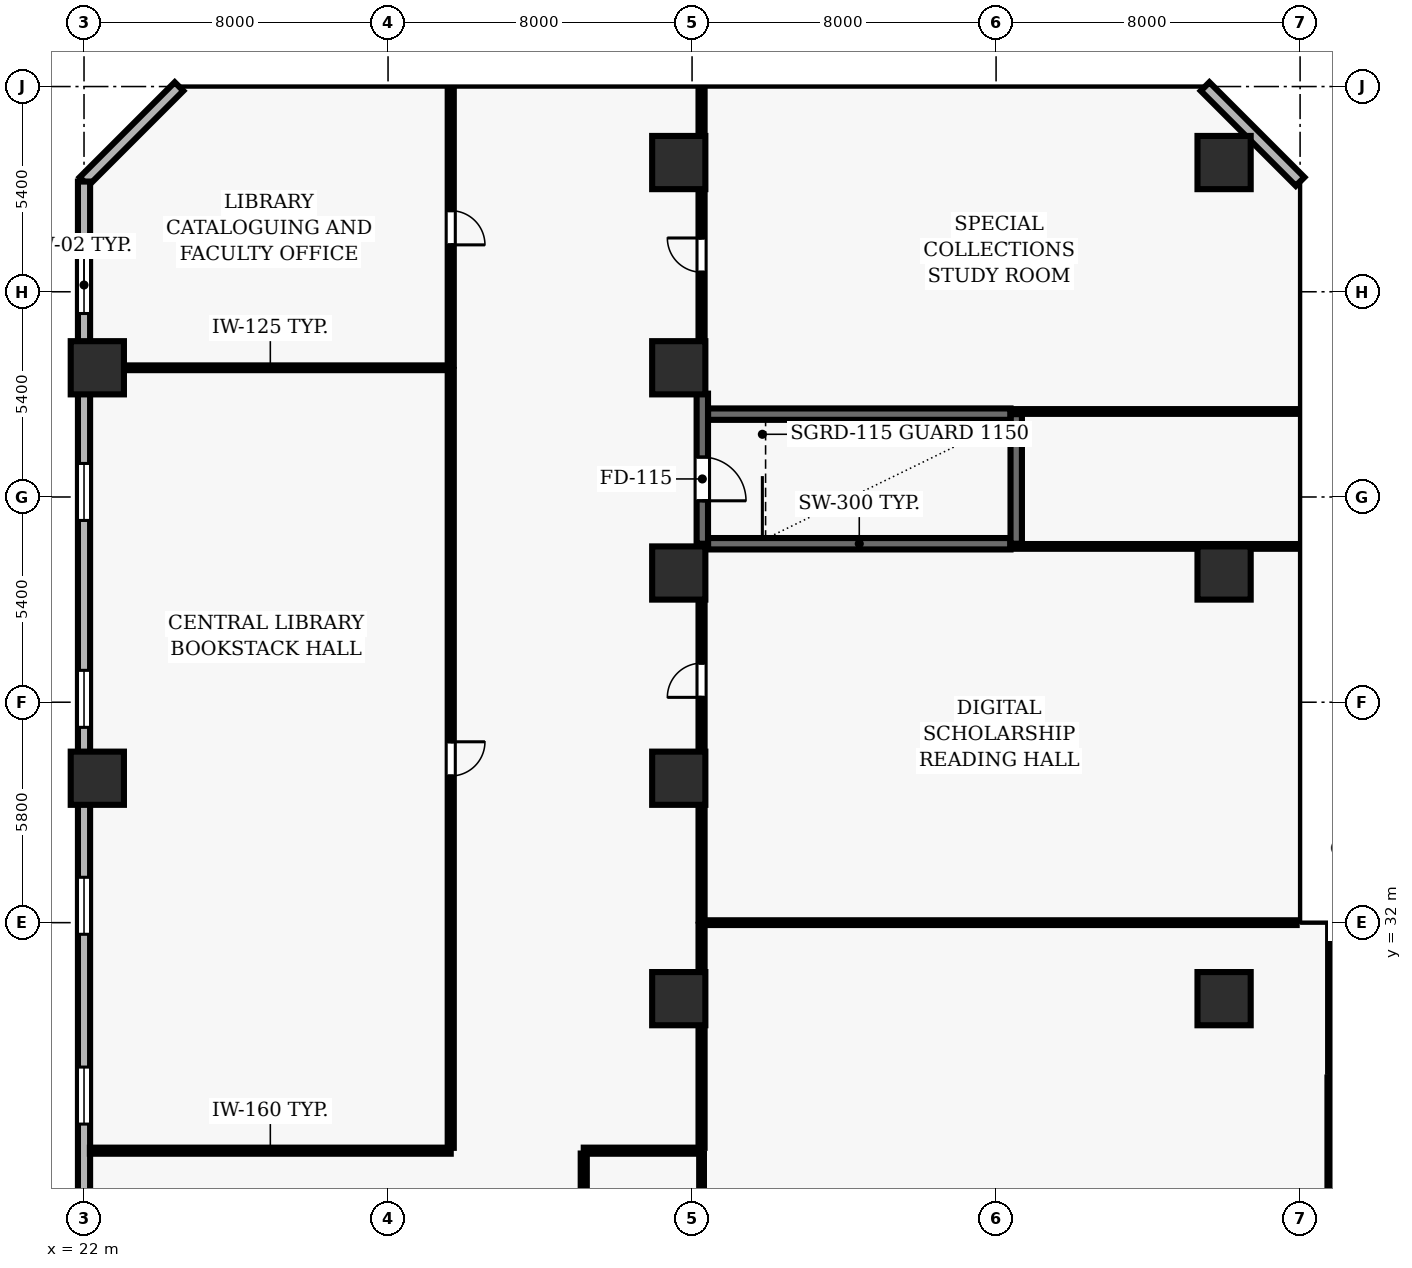
"""IFC4 building model, lengths in metres.
Left out: names, types, materials, properties, quantities, classifications, styles, units other than length and angle.
Written with IfcOpenShell. Run it as: python <this file> out.ifc"""

import sys

from ifc_helpers import new_model, si_unit, direction, frame, frame_2d, origin, origin_2d, place, context, subcontext, project, spatial, rectangle, extrude, element, fill, save


model = new_model("IFC4")
c1 = context("Model", 3, precision=1e-05, world=origin(), true_north=direction((0.0, 1.0)))
c2 = subcontext(c1, "Body", "Model", "MODEL_VIEW")
j1 = project(units=[si_unit("LENGTHUNIT", "METRE"), si_unit("PLANEANGLEUNIT", "RADIAN")], contexts=[c1])
p1 = place(None, origin())
s1 = spatial("IfcSite", under=j1, at=p1, CompositionType="ELEMENT")
p2 = place(p1, origin())
s2 = spatial("IfcBuilding", under=s1, at=p2, CompositionType="ELEMENT")
p3 = place(p2, frame((0.0, 0.0, 20.8)))
s3 = spatial("IfcBuildingStorey", under=s2, at=p3, CompositionType="ELEMENT", Elevation=20.8)
for number, where, z_axis, x_axis in (
    (1, (37.65, 30.0, 0.0), (0.0, 0.0, 1.0), (1.0, 0.0, 0.0)),
    (2, (22.35, 35.8, 0.0), (0.0, 0.0, 1.0), (1.0, 0.0, 0.0)),
    (3, (37.65, 35.8, 0.0), (0.0, 0.0, 1.0), (1.0, 0.0, 0.0)),
    (4, (37.65, 41.2, 0.0), (0.0, 0.0, 1.0), (1.0, 0.0, 0.0)),
    (5, (22.35, 46.6, 0.0), (0.0, 0.0, 1.0), (1.0, 0.0, 0.0)),
    (6, (37.65, 46.6, 0.0), (0.0, 0.0, 1.0), (1.0, 0.0, 0.0)),
    (7, (37.65, 52.0, 0.0), (0.0, 0.0, 1.0), (1.0, 0.0, 0.0)),
    (8, (52.0, 30.0, 0.0), (0.0, 0.0, 1.0), (1.0, 0.0, 0.0)),
    (9, (52.0, 41.2, 0.0), (0.0, 0.0, 1.0), (1.0, 0.0, 0.0)),
    (10, (52.0, 52.0, 0.0), (0.0, 0.0, 1.0), (1.0, 0.0, 0.0)),
):
    element("IfcColumn", number, at=place(p3, frame(where, z_axis=z_axis, x_axis=x_axis)), inside=s3, PredefinedType="COLUMN", context=c2, shape_type="SweptSolid", body=[
        extrude(rectangle(XDim=1.4, YDim=1.4, at=origin_2d()), origin(), (0.0, 0.0, 1.0), 5.2),
    ])
for number, where, z_axis, x_axis in (
    (11, (54.0, 51.5, 0.0), (0.0, 0.0, 1.0), (-0.707, 0.707, 0.0)),
    (12, (24.5, 54.0, 0.0), (0.0, 0.0, 1.0), (-0.707, -0.707, 0.0)),
):
    element("IfcWall", number, at=place(p3, frame(where, z_axis=z_axis, x_axis=x_axis)), inside=s3, PredefinedType="SOLIDWALL", context=c2, shape_type="SweptSolid", body=[
        extrude(rectangle(XDim=3.536, YDim=0.32, at=frame_2d((1.768, 0.0))), origin(), (0.0, 0.0, 1.0), 4.78),
    ])
p4 = place(p3, frame((22.0, 51.5, 0.0), z_axis=(0.0, 0.0, 1.0), x_axis=(0.0, -1.0, 0.0)))
e13 = element("IfcWall", 13, at=p4, inside=s3, PredefinedType="SOLIDWALL", context=c2, shape_type="SweptSolid", body=[
    extrude(rectangle(XDim=49.0, YDim=0.32, at=frame_2d((24.5, 0.0))), origin(), (0.0, 0.0, 1.0), 4.78),
])
p5 = place(p4, frame((1.972, 0.0, 0.9)))
e14 = element("IfcOpeningElement", 14, at=p5, cuts=e13, PredefinedType="OPENING", context=c2, shape_type="SweptSolid", body=[
    extrude(rectangle(XDim=1.5, YDim=1.6, at=frame_2d((0.75, 0.8))), frame((0.0, 0.17, 0.0), z_axis=(0.0, -1.0, 0.0), x_axis=(1.0, 0.0, 0.0)), (0.0, 0.0, 1.0), 0.34),
])
p6 = place(p4, frame((7.417, 0.0, 0.9)))
e15 = element("IfcOpeningElement", 15, at=p6, cuts=e13, PredefinedType="OPENING", context=c2, shape_type="SweptSolid", body=[
    extrude(rectangle(XDim=1.5, YDim=1.6, at=frame_2d((0.75, 0.8))), frame((0.0, 0.17, 0.0), z_axis=(0.0, -1.0, 0.0), x_axis=(1.0, 0.0, 0.0)), (0.0, 0.0, 1.0), 0.34),
])
p7 = place(p4, frame((12.861, 0.0, 0.9)))
e16 = element("IfcOpeningElement", 16, at=p7, cuts=e13, PredefinedType="OPENING", context=c2, shape_type="SweptSolid", body=[
    extrude(rectangle(XDim=1.5, YDim=1.6, at=frame_2d((0.75, 0.8))), frame((0.0, 0.17, 0.0), z_axis=(0.0, -1.0, 0.0), x_axis=(1.0, 0.0, 0.0)), (0.0, 0.0, 1.0), 0.34),
])
p8 = place(p4, frame((18.306, 0.0, 0.9)))
e17 = element("IfcOpeningElement", 17, at=p8, cuts=e13, PredefinedType="OPENING", context=c2, shape_type="SweptSolid", body=[
    extrude(rectangle(XDim=1.5, YDim=1.6, at=frame_2d((0.75, 0.8))), frame((0.0, 0.17, 0.0), z_axis=(0.0, -1.0, 0.0), x_axis=(1.0, 0.0, 0.0)), (0.0, 0.0, 1.0), 0.34),
])
p9 = place(p4, frame((23.3, 0.0, 0.9)))
e18 = element("IfcOpeningElement", 18, at=p9, cuts=e13, PredefinedType="OPENING", context=c2, shape_type="SweptSolid", body=[
    extrude(rectangle(XDim=1.5, YDim=1.6, at=frame_2d((0.75, 0.8))), frame((0.0, 0.17, 0.0), z_axis=(0.0, -1.0, 0.0), x_axis=(1.0, 0.0, 0.0)), (0.0, 0.0, 1.0), 0.34),
])
p10 = place(p4, frame((29.194, 0.0, 0.9)))
e19 = element("IfcOpeningElement", 19, at=p10, cuts=e13, PredefinedType="OPENING", context=c2, shape_type="SweptSolid", body=[
    extrude(rectangle(XDim=1.5, YDim=1.6, at=frame_2d((0.75, 0.8))), frame((0.0, 0.17, 0.0), z_axis=(0.0, -1.0, 0.0), x_axis=(1.0, 0.0, 0.0)), (0.0, 0.0, 1.0), 0.34),
])
p11 = place(p4, frame((34.189, 0.0, 0.9)))
e20 = element("IfcOpeningElement", 20, at=p11, cuts=e13, PredefinedType="OPENING", context=c2, shape_type="SweptSolid", body=[
    extrude(rectangle(XDim=1.5, YDim=1.6, at=frame_2d((0.75, 0.8))), frame((0.0, 0.17, 0.0), z_axis=(0.0, -1.0, 0.0), x_axis=(1.0, 0.0, 0.0)), (0.0, 0.0, 1.0), 0.34),
])
p12 = place(p4, frame((40.083, 0.0, 0.9)))
e21 = element("IfcOpeningElement", 21, at=p12, cuts=e13, PredefinedType="OPENING", context=c2, shape_type="SweptSolid", body=[
    extrude(rectangle(XDim=1.5, YDim=1.6, at=frame_2d((0.75, 0.8))), frame((0.0, 0.17, 0.0), z_axis=(0.0, -1.0, 0.0), x_axis=(1.0, 0.0, 0.0)), (0.0, 0.0, 1.0), 0.34),
])
p13 = place(p3, frame((38.42, 41.97, 0.0), z_axis=(0.0, 0.0, 1.0), x_axis=(1.0, 0.0, 0.0)))
e22 = element("IfcWall", 22, at=p13, inside=s3, PredefinedType="SHEAR", context=c2, shape_type="SweptSolid", body=[
    extrude(rectangle(XDim=7.96, YDim=0.3, at=frame_2d((3.98, 0.0))), origin(), (0.0, 0.0, 1.0), 4.78),
])
p14 = place(p3, frame((46.53, 41.97, 0.0), z_axis=(0.0, 0.0, 1.0), x_axis=(0.0, 1.0, 0.0)))
e23 = element("IfcWall", 23, at=p14, inside=s3, PredefinedType="SHEAR", context=c2, shape_type="SweptSolid", body=[
    extrude(rectangle(XDim=3.41, YDim=0.3, at=frame_2d((1.705, 0.0))), origin(), (0.0, 0.0, 1.0), 4.78),
])
p15 = place(p3, frame((46.38, 45.38, 0.0), z_axis=(0.0, 0.0, 1.0), x_axis=(-1.0, 0.0, 0.0)))
e24 = element("IfcWall", 24, at=p15, inside=s3, PredefinedType="SHEAR", context=c2, shape_type="SweptSolid", body=[
    extrude(rectangle(XDim=7.96, YDim=0.3, at=frame_2d((3.98, 0.0))), origin(), (0.0, 0.0, 1.0), 4.78),
])
p16 = place(p3, frame((38.27, 45.92, 0.0), z_axis=(0.0, 0.0, 1.0), x_axis=(0.0, -1.0, 0.0)))
e25 = element("IfcWall", 25, at=p16, inside=s3, PredefinedType="SHEAR", context=c2, shape_type="SweptSolid", body=[
    extrude(rectangle(XDim=3.95, YDim=0.3, at=frame_2d((1.975, 0.0))), origin(), (0.0, 0.0, 1.0), 4.78),
])
p17 = place(p16, frame((1.67, 0.0, 0.0)))
e26 = element("IfcOpeningElement", 26, at=p17, cuts=e25, PredefinedType="OPENING", context=c2, shape_type="SweptSolid", body=[
    extrude(rectangle(XDim=1.15, YDim=2.15, at=frame_2d((0.575, 1.075))), frame((0.0, 0.16, 0.0), z_axis=(0.0, -1.0, 0.0), x_axis=(1.0, 0.0, 0.0)), (0.0, 0.0, 1.0), 0.32),
])
p18 = place(p3, frame((31.65, 26.0, 0.0), z_axis=(0.0, 0.0, 1.0), x_axis=(-1.0, 0.0, 0.0)))
e27 = element("IfcWall", 27, at=p18, inside=s3, PredefinedType="PARTITIONING", context=c2, shape_type="SweptSolid", body=[
    extrude(rectangle(XDim=9.495, YDim=0.16, at=frame_2d((4.748, 0.0))), origin(), (0.0, 0.0, 1.0), 4.78),
])
p19 = place(p3, frame((31.65, 46.6, 0.0), z_axis=(0.0, 0.0, 1.0), x_axis=(-1.0, 0.0, 0.0)))
e28 = element("IfcWall", 28, at=p19, inside=s3, PredefinedType="PARTITIONING", context=c2, shape_type="SweptSolid", body=[
    extrude(rectangle(XDim=9.495, YDim=0.125, at=frame_2d((4.748, 0.0))), origin(), (0.0, 0.0, 1.0), 3.58),
])
p20 = place(p3, frame((35.15, 26.0, 0.0), z_axis=(0.0, 0.0, 1.0), x_axis=(1.0, 0.0, 0.0)))
e29 = element("IfcWall", 29, at=p20, inside=s3, PredefinedType="PARTITIONING", context=c2, shape_type="SweptSolid", body=[
    extrude(rectangle(XDim=3.1, YDim=0.16, at=frame_2d((1.55, 0.0))), origin(), (0.0, 0.0, 1.0), 4.78),
])
p21 = place(p3, frame((38.25, 32.0, 0.0), z_axis=(0.0, 0.0, 1.0), x_axis=(1.0, 0.0, 0.0)))
e30 = element("IfcWall", 30, at=p21, inside=s3, PredefinedType="PARTITIONING", context=c2, shape_type="SweptSolid", body=[
    extrude(rectangle(XDim=15.66, YDim=0.125, at=frame_2d((7.83, 0.0))), origin(), (0.0, 0.0, 1.0), 4.78),
])
for number, where, z_axis, x_axis in (
    (31, (46.38, 45.45, 0.0), (0.0, 0.0, 1.0), (1.0, 0.0, 0.0)),
    (32, (53.91, 41.9, 0.0), (0.0, 0.0, 1.0), (-1.0, 0.0, 0.0)),
):
    element("IfcWall", number, at=place(p3, frame(where, z_axis=z_axis, x_axis=x_axis)), inside=s3, PredefinedType="PARTITIONING", context=c2, shape_type="SweptSolid", body=[
        extrude(rectangle(XDim=7.53, YDim=0.125, at=frame_2d((3.765, 0.0))), origin(), (0.0, 0.0, 1.0), 4.78),
    ])
p22 = place(p3, frame((58.45, 28.0, 0.0), z_axis=(0.0, 0.0, 1.0), x_axis=(-1.0, 0.0, 0.0)))
e33 = element("IfcWall", 33, at=p22, inside=s3, PredefinedType="PARTITIONING", context=c2, shape_type="SweptSolid", body=[
    extrude(rectangle(XDim=3.65, YDim=0.16, at=frame_2d((1.825, 0.0))), origin(), (0.0, 0.0, 1.0), 4.78),
])
p23 = place(p3, frame((31.65, 46.543, 0.0), z_axis=(0.0, 0.0, 1.0), x_axis=(0.0, -1.0, 0.0)))
e34 = element("IfcWall", 34, at=p23, inside=s3, PredefinedType="PARTITIONING", context=c2, shape_type="SweptSolid", body=[
    extrude(rectangle(XDim=20.468, YDim=0.16, at=frame_2d((10.234, 0.0))), origin(), (0.0, 0.0, 1.0), 4.78),
])
p24 = place(p23, frame((9.784, 0.0, 0.0)))
e35 = element("IfcOpeningElement", 35, at=p24, cuts=e34, PredefinedType="OPENING", context=c2, shape_type="SweptSolid", body=[
    extrude(rectangle(XDim=0.9, YDim=2.1, at=frame_2d((0.45, 1.05))), frame((0.0, 0.09, 0.0), z_axis=(0.0, -1.0, 0.0), x_axis=(1.0, 0.0, 0.0)), (0.0, 0.0, 1.0), 0.18),
])
p25 = place(p3, frame((31.65, 53.91, 0.0), z_axis=(0.0, 0.0, 1.0), x_axis=(0.0, -1.0, 0.0)))
e36 = element("IfcWall", 36, at=p25, inside=s3, PredefinedType="PARTITIONING", context=c2, shape_type="SweptSolid", body=[
    extrude(rectangle(XDim=7.253, YDim=0.16, at=frame_2d((3.626, 0.0))), origin(), (0.0, 0.0, 1.0), 4.78),
])
p26 = place(p25, frame((3.176, 0.0, 0.0)))
e37 = element("IfcOpeningElement", 37, at=p26, cuts=e36, PredefinedType="OPENING", context=c2, shape_type="SweptSolid", body=[
    extrude(rectangle(XDim=0.9, YDim=2.1, at=frame_2d((0.45, 1.05))), frame((0.0, 0.09, 0.0), z_axis=(0.0, -1.0, 0.0), x_axis=(1.0, 0.0, 0.0)), (0.0, 0.0, 1.0), 0.18),
])
p27 = place(p3, frame((35.15, 24.07, 0.0), z_axis=(0.0, 0.0, 1.0), x_axis=(0.0, 1.0, 0.0)))
e38 = element("IfcWall", 38, at=p27, inside=s3, PredefinedType="PARTITIONING", context=c2, shape_type="SweptSolid", body=[
    extrude(rectangle(XDim=1.855, YDim=0.16, at=frame_2d((0.927, 0.0))), origin(), (0.0, 0.0, 1.0), 4.78),
])
p28 = place(p3, frame((38.25, 25.925, 0.0), z_axis=(0.0, 0.0, 1.0), x_axis=(0.0, -1.0, 0.0)))
e39 = element("IfcWall", 39, at=p28, inside=s3, PredefinedType="PARTITIONING", context=c2, shape_type="SweptSolid", body=[
    extrude(rectangle(XDim=15.2, YDim=0.125, at=frame_2d((7.6, 0.0))), origin(), (0.0, 0.0, 1.0), 4.78),
])
p29 = place(p3, frame((38.25, 26.075, 0.0), z_axis=(0.0, 0.0, 1.0), x_axis=(0.0, 1.0, 0.0)))
e40 = element("IfcWall", 40, at=p29, inside=s3, PredefinedType="PARTITIONING", context=c2, shape_type="SweptSolid", body=[
    extrude(rectangle(XDim=5.867, YDim=0.16, at=frame_2d((2.934, 0.0))), origin(), (0.0, 0.0, 1.0), 4.78),
])
p30 = place(p3, frame((38.25, 32.057, 0.0), z_axis=(0.0, 0.0, 1.0), x_axis=(0.0, 1.0, 0.0)))
e41 = element("IfcWall", 41, at=p30, inside=s3, PredefinedType="PARTITIONING", context=c2, shape_type="SweptSolid", body=[
    extrude(rectangle(XDim=9.843, YDim=0.16, at=frame_2d((4.921, 0.0))), origin(), (0.0, 0.0, 1.0), 4.78),
])
p31 = place(p30, frame((5.871, 0.0, 0.0)))
e42 = element("IfcOpeningElement", 42, at=p31, cuts=e41, PredefinedType="OPENING", context=c2, shape_type="SweptSolid", body=[
    extrude(rectangle(XDim=0.9, YDim=2.1, at=frame_2d((0.45, 1.05))), frame((0.0, 0.09, 0.0), z_axis=(0.0, -1.0, 0.0), x_axis=(1.0, 0.0, 0.0)), (0.0, 0.0, 1.0), 0.18),
])
p32 = place(p3, frame((38.25, 45.92, 0.0), z_axis=(0.0, 0.0, 1.0), x_axis=(0.0, 1.0, 0.0)))
e43 = element("IfcWall", 43, at=p32, inside=s3, PredefinedType="PARTITIONING", context=c2, shape_type="SweptSolid", body=[
    extrude(rectangle(XDim=7.99, YDim=0.16, at=frame_2d((3.995, 0.0))), origin(), (0.0, 0.0, 1.0), 4.78),
])
p33 = place(p32, frame((3.195, 0.0, 0.0)))
e44 = element("IfcOpeningElement", 44, at=p33, cuts=e43, PredefinedType="OPENING", context=c2, shape_type="SweptSolid", body=[
    extrude(rectangle(XDim=0.9, YDim=2.1, at=frame_2d((0.45, 1.05))), frame((0.0, 0.09, 0.0), z_axis=(0.0, -1.0, 0.0), x_axis=(1.0, 0.0, 0.0)), (0.0, 0.0, 1.0), 0.18),
])
p34 = place(p3, frame((54.8, 28.075, 0.0), z_axis=(0.0, 0.0, 1.0), x_axis=(0.0, 1.0, 0.0)))
e45 = element("IfcWall", 45, at=p34, inside=s3, PredefinedType="PARTITIONING", context=c2, shape_type="SweptSolid", body=[
    extrude(rectangle(XDim=3.835, YDim=0.125, at=frame_2d((1.917, 0.0))), origin(), (0.0, 0.0, 1.0), 4.229),
])
p35 = place(p3, frame((54.8, 27.925, 0.0), z_axis=(0.0, 0.0, 1.0), x_axis=(0.0, -1.0, 0.0)))
e46 = element("IfcWall", 46, at=p35, inside=s3, PredefinedType="PARTITIONING", context=c2, shape_type="SweptSolid", body=[
    extrude(rectangle(XDim=17.2, YDim=0.16, at=frame_2d((8.6, 0.0))), origin(), (0.0, 0.0, 1.0), 4.229),
])
p36 = place(p35, frame((8.15, 0.0, 0.0)))
e47 = element("IfcOpeningElement", 47, at=p36, cuts=e46, PredefinedType="OPENING", context=c2, shape_type="SweptSolid", body=[
    extrude(rectangle(XDim=0.9, YDim=2.1, at=frame_2d((0.45, 1.05))), frame((0.0, 0.09, 0.0), z_axis=(0.0, -1.0, 0.0), x_axis=(1.0, 0.0, 0.0)), (0.0, 0.0, 1.0), 0.18),
])
p37 = place(p5, origin())
e48 = element("IfcWindow", 48, at=p37, inside=s3, PartitioningType="SINGLE_PANEL", PredefinedType="WINDOW", context=c2, shape_type="SweptSolid", body=[
    extrude(rectangle(XDim=1.5, YDim=1.6, at=frame_2d((0.75, 0.8))), frame((0.0, 0.03, 0.0), z_axis=(0.0, -1.0, 0.0), x_axis=(1.0, 0.0, 0.0)), (0.0, 0.0, 1.0), 0.06),
])
fill(e14, e48)
p38 = place(p6, origin())
e49 = element("IfcWindow", 49, at=p38, inside=s3, PartitioningType="SINGLE_PANEL", PredefinedType="WINDOW", context=c2, shape_type="SweptSolid", body=[
    extrude(rectangle(XDim=1.5, YDim=1.6, at=frame_2d((0.75, 0.8))), frame((0.0, 0.03, 0.0), z_axis=(0.0, -1.0, 0.0), x_axis=(1.0, 0.0, 0.0)), (0.0, 0.0, 1.0), 0.06),
])
fill(e15, e49)
p39 = place(p7, origin())
e50 = element("IfcWindow", 50, at=p39, inside=s3, PartitioningType="SINGLE_PANEL", PredefinedType="WINDOW", context=c2, shape_type="SweptSolid", body=[
    extrude(rectangle(XDim=1.5, YDim=1.6, at=frame_2d((0.75, 0.8))), frame((0.0, 0.03, 0.0), z_axis=(0.0, -1.0, 0.0), x_axis=(1.0, 0.0, 0.0)), (0.0, 0.0, 1.0), 0.06),
])
fill(e16, e50)
p40 = place(p8, origin())
e51 = element("IfcWindow", 51, at=p40, inside=s3, PartitioningType="SINGLE_PANEL", PredefinedType="WINDOW", context=c2, shape_type="SweptSolid", body=[
    extrude(rectangle(XDim=1.5, YDim=1.6, at=frame_2d((0.75, 0.8))), frame((0.0, 0.03, 0.0), z_axis=(0.0, -1.0, 0.0), x_axis=(1.0, 0.0, 0.0)), (0.0, 0.0, 1.0), 0.06),
])
fill(e17, e51)
p41 = place(p9, origin())
e52 = element("IfcWindow", 52, at=p41, inside=s3, PartitioningType="SINGLE_PANEL", PredefinedType="WINDOW", context=c2, shape_type="SweptSolid", body=[
    extrude(rectangle(XDim=1.5, YDim=1.6, at=frame_2d((0.75, 0.8))), frame((0.0, 0.03, 0.0), z_axis=(0.0, -1.0, 0.0), x_axis=(1.0, 0.0, 0.0)), (0.0, 0.0, 1.0), 0.06),
])
fill(e18, e52)
p42 = place(p17, origin())
e53 = element("IfcDoor", 53, at=p42, inside=s3, OperationType="SINGLE_SWING_RIGHT", PredefinedType="DOOR", context=c2, shape_type="SweptSolid", body=[
    extrude(rectangle(XDim=1.15, YDim=2.15, at=frame_2d((0.575, 1.075))), frame((0.0, 0.025, 0.0), z_axis=(0.0, -1.0, 0.0), x_axis=(1.0, 0.0, 0.0)), (0.0, 0.0, 1.0), 0.05),
])
fill(e26, e53)
p43 = place(p24, origin())
e54 = element("IfcDoor", 54, at=p43, inside=s3, OperationType="SINGLE_SWING_LEFT", PredefinedType="DOOR", context=c2, shape_type="SweptSolid", body=[
    extrude(rectangle(XDim=0.9, YDim=2.1, at=frame_2d((0.45, 1.05))), frame((0.0, 0.025, 0.0), z_axis=(0.0, -1.0, 0.0), x_axis=(1.0, 0.0, 0.0)), (0.0, 0.0, 1.0), 0.05),
])
fill(e35, e54)
p44 = place(p26, origin())
e55 = element("IfcDoor", 55, at=p44, inside=s3, OperationType="SINGLE_SWING_RIGHT", PredefinedType="DOOR", context=c2, shape_type="SweptSolid", body=[
    extrude(rectangle(XDim=0.9, YDim=2.1, at=frame_2d((0.45, 1.05))), frame((0.0, 0.025, 0.0), z_axis=(0.0, -1.0, 0.0), x_axis=(1.0, 0.0, 0.0)), (0.0, 0.0, 1.0), 0.05),
])
fill(e37, e55)
p45 = place(p31, origin())
e56 = element("IfcDoor", 56, at=p45, inside=s3, OperationType="SINGLE_SWING_LEFT", PredefinedType="DOOR", context=c2, shape_type="SweptSolid", body=[
    extrude(rectangle(XDim=0.9, YDim=2.1, at=frame_2d((0.45, 1.05))), frame((0.0, 0.025, 0.0), z_axis=(0.0, -1.0, 0.0), x_axis=(1.0, 0.0, 0.0)), (0.0, 0.0, 1.0), 0.05),
])
fill(e42, e56)
p46 = place(p33, origin())
e57 = element("IfcDoor", 57, at=p46, inside=s3, OperationType="SINGLE_SWING_RIGHT", PredefinedType="DOOR", context=c2, shape_type="SweptSolid", body=[
    extrude(rectangle(XDim=0.9, YDim=2.1, at=frame_2d((0.45, 1.05))), frame((0.0, 0.025, 0.0), z_axis=(0.0, -1.0, 0.0), x_axis=(1.0, 0.0, 0.0)), (0.0, 0.0, 1.0), 0.05),
])
fill(e44, e57)
save(model, sys.argv[1])
